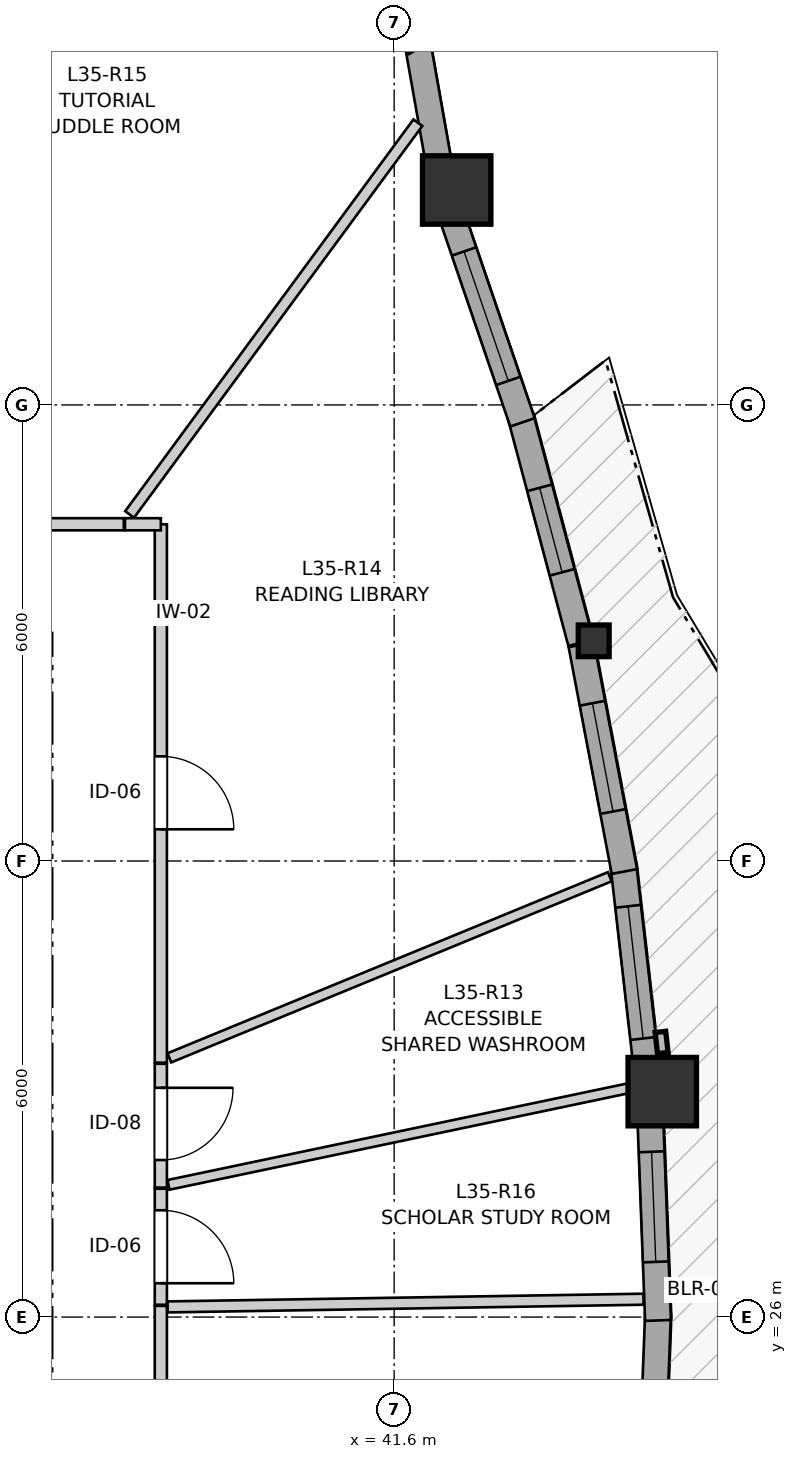
"""IFC4 building model, lengths in metres.
Left out: names, types, materials, properties, quantities, classifications, styles, units other than length and angle.
Written with IfcOpenShell. Run it as: python <this file> out.ifc"""

import sys

from ifc_helpers import new_model, si_unit, direction, frame, frame_2d, origin, origin_2d, place, context, subcontext, project, spatial, rectangle, i_section, extrude, source, transform, mapped, element, fill, save


model = new_model("IFC4")
c1 = context("Model", 3, precision=1e-05, world=origin(), true_north=direction((0.0, 1.0)))
c2 = subcontext(c1, "Body", "Model", "MODEL_VIEW")
j1 = project(units=[si_unit("LENGTHUNIT", "METRE"), si_unit("PLANEANGLEUNIT", "RADIAN")], contexts=[c1])
p1 = place(None, origin())
s1 = spatial("IfcSite", under=j1, at=p1, CompositionType="ELEMENT")
p2 = place(p1, origin())
s2 = spatial("IfcBuilding", under=s1, at=p2, CompositionType="ELEMENT")
p3 = place(p2, frame((0.0, 0.0, 118.4)))
s3 = spatial("IfcBuildingStorey", under=s2, at=p3, CompositionType="ELEMENT", Elevation=118.4)
m1 = source(origin(), c2, "Body", "SweptSolid", [
    extrude(rectangle(XDim=0.9, YDim=0.9, at=origin_2d()), origin(), (0.0, 0.0, 1.0), 2.95),
])
p4 = place(p3, frame((45.127, 28.966, 0.0), z_axis=(0.0, 0.0, 1.0), x_axis=(1.0, 0.0, 0.0)))
e1 = element("IfcColumn", 1, at=p4, inside=s3, PredefinedType="COLUMN", context=c2, shape_type="MappedRepresentation", body=[
    mapped(m1, transform((0.0, 0.0, 0.0), x_axis=(1.0, 0.0, 0.0), y_axis=(0.0, 1.0, 0.0), z_axis=(0.0, 0.0, 1.0), scale=1.0)),
])
m2 = source(origin(), c2, "Body", "SweptSolid", [
    extrude(i_section(OverallWidth=0.406, OverallDepth=0.416, WebThickness=0.027, FlangeThickness=0.044, FilletRadius=0.015, at=origin_2d()), origin(), (0.0, 0.0, 1.0), 2.95),
])
p5 = place(p3, frame((44.226, 34.896, 0.0), z_axis=(0.0, 0.0, 1.0), x_axis=(1.0, 0.0, 0.0)))
e2 = element("IfcColumn", 2, at=p5, inside=s3, PredefinedType="PILASTER", context=c2, shape_type="MappedRepresentation", body=[
    mapped(m2, transform((0.0, 0.0, 0.0), x_axis=(1.0, 0.0, 0.0), y_axis=(0.0, 1.0, 0.0), z_axis=(0.0, 0.0, 1.0), scale=1.0)),
])
p6 = place(p3, frame((42.423, 40.828, 0.0), z_axis=(0.0, 0.0, 1.0), x_axis=(1.0, 0.0, 0.0)))
e3 = element("IfcColumn", 3, at=p6, inside=s3, PredefinedType="COLUMN", context=c2, shape_type="MappedRepresentation", body=[
    mapped(m1, transform((0.0, 0.0, 0.0), x_axis=(1.0, 0.0, 0.0), y_axis=(0.0, 1.0, 0.0), z_axis=(0.0, 0.0, 1.0), scale=1.0)),
])
p7 = place(p3, frame((44.958, 23.061, 0.0), z_axis=(0.0, 0.0, 1.0), x_axis=(0.037940097137, 0.999280015326, 0.0)))
e4 = element("IfcWall", 4, at=p7, inside=s3, PredefinedType="SOLIDWALL", context=c2, shape_type="SweptSolid", body=[
    extrude(rectangle(XDim=2.986, YDim=0.34, at=frame_2d((1.493, 0.0))), origin(), (0.0, 0.0, 1.0), 2.48),
])
p8 = place(p7, frame((1.008, 0.0, 0.82)))
e5 = element("IfcOpeningElement", 5, at=p8, cuts=e4, PredefinedType="OPENING", context=c2, shape_type="SweptSolid", body=[
    extrude(rectangle(XDim=0.95, YDim=1.35, at=frame_2d((0.475, 0.675))), frame((0.0, 0.18, 0.0), z_axis=(0.0, -1.0, 0.0), x_axis=(1.0, 0.0, 0.0)), (0.0, 0.0, 1.0), 0.36),
])
p9 = place(p3, frame((45.071, 25.956, 0.0), z_axis=(0.0, 0.0, 1.0), x_axis=(-0.037997361734, 0.999277839493, 0.0)))
e6 = element("IfcWall", 6, at=p9, inside=s3, PredefinedType="SOLIDWALL", context=c2, shape_type="SweptSolid", body=[
    extrude(rectangle(XDim=2.776, YDim=0.34, at=frame_2d((1.388, 0.0))), origin(), (0.0, 0.0, 1.0), 2.48),
])
p10 = place(p9, frame((0.771, 0.0, 0.82)))
e7 = element("IfcOpeningElement", 7, at=p10, cuts=e6, PredefinedType="OPENING", context=c2, shape_type="SweptSolid", body=[
    extrude(rectangle(XDim=1.45, YDim=1.25, at=frame_2d((0.725, 0.625))), frame((0.0, 0.18, 0.0), z_axis=(0.0, -1.0, 0.0), x_axis=(1.0, 0.0, 0.0)), (0.0, 0.0, 1.0), 0.36),
])
p11 = place(p3, frame((44.932, 29.175, 0.0), z_axis=(0.0, 0.0, 1.0), x_axis=(-0.113290188042, 0.993561942354, 0.0)))
e8 = element("IfcWall", 8, at=p11, inside=s3, PredefinedType="SOLIDWALL", context=c2, shape_type="SweptSolid", body=[
    extrude(rectangle(XDim=2.793, YDim=0.34, at=frame_2d((1.396, 0.0))), origin(), (0.0, 0.0, 1.0), 2.48),
])
p12 = place(p11, frame((0.493, 0.0, 0.82)))
e9 = element("IfcOpeningElement", 9, at=p12, cuts=e8, PredefinedType="OPENING", context=c2, shape_type="SweptSolid", body=[
    extrude(rectangle(XDim=1.75, YDim=1.3, at=frame_2d((0.875, 0.65))), frame((0.0, 0.18, 0.0), z_axis=(0.0, -1.0, 0.0), x_axis=(1.0, 0.0, 0.0)), (0.0, 0.0, 1.0), 0.36),
])
p13 = place(p3, frame((44.629, 31.862, 0.0), z_axis=(0.0, 0.0, 1.0), x_axis=(-0.186690909565, 0.982418701108, 0.0)))
e10 = element("IfcWall", 10, at=p13, inside=s3, PredefinedType="SOLIDWALL", context=c2, shape_type="SweptSolid", body=[
    extrude(rectangle(XDim=3.037, YDim=0.34, at=frame_2d((1.518, 0.0))), origin(), (0.0, 0.0, 1.0), 2.48),
])
p14 = place(p13, frame((0.803, 0.0, 0.82)))
e11 = element("IfcOpeningElement", 11, at=p14, cuts=e10, PredefinedType="OPENING", context=c2, shape_type="SweptSolid", body=[
    extrude(rectangle(XDim=1.45, YDim=1.25, at=frame_2d((0.725, 0.625))), frame((0.0, 0.18, 0.0), z_axis=(0.0, -1.0, 0.0), x_axis=(1.0, 0.0, 0.0)), (0.0, 0.0, 1.0), 0.36),
])
p15 = place(p3, frame((44.056, 34.872, 0.0), z_axis=(0.0, 0.0, 1.0), x_axis=(-0.257081647056, 0.966389686797, 0.0)))
e12 = element("IfcWall", 12, at=p15, inside=s3, PredefinedType="SOLIDWALL", context=c2, shape_type="SweptSolid", body=[
    extrude(rectangle(XDim=3.086, YDim=0.34, at=frame_2d((1.543, 0.0))), origin(), (0.0, 0.0, 1.0), 2.48),
])
p16 = place(p15, frame((0.958, 0.0, 0.82)))
e13 = element("IfcOpeningElement", 13, at=p16, cuts=e12, PredefinedType="OPENING", context=c2, shape_type="SweptSolid", body=[
    extrude(rectangle(XDim=1.15, YDim=1.2, at=frame_2d((0.575, 0.6))), frame((0.0, 0.18, 0.0), z_axis=(0.0, -1.0, 0.0), x_axis=(1.0, 0.0, 0.0)), (0.0, 0.0, 1.0), 0.36),
])
p17 = place(p3, frame((43.288, 37.771, 0.0), z_axis=(0.0, 0.0, 1.0), x_axis=(-0.323537149191, 0.94621546864, 0.0)))
e14 = element("IfcWall", 14, at=p17, inside=s3, PredefinedType="SOLIDWALL", context=c2, shape_type="SweptSolid", body=[
    extrude(rectangle(XDim=2.942, YDim=0.34, at=frame_2d((1.471, 0.0))), origin(), (0.0, 0.0, 1.0), 2.48),
])
p18 = place(p17, frame((0.576, 0.0, 0.82)))
e15 = element("IfcOpeningElement", 15, at=p18, cuts=e14, PredefinedType="OPENING", context=c2, shape_type="SweptSolid", body=[
    extrude(rectangle(XDim=1.8, YDim=1.45, at=frame_2d((0.9, 0.725))), frame((0.0, 0.18, 0.0), z_axis=(0.0, -1.0, 0.0), x_axis=(1.0, 0.0, 0.0)), (0.0, 0.0, 1.0), 0.36),
])
p19 = place(p3, frame((42.215, 41.024, 0.0), z_axis=(0.0, 0.0, 1.0), x_axis=(-0.17440141227, 0.984674640375, 0.0)))
e16 = element("IfcWall", 16, at=p19, inside=s3, PredefinedType="SOLIDWALL", context=c2, shape_type="SweptSolid", body=[
    extrude(rectangle(XDim=1.831, YDim=0.34, at=frame_2d((0.916, 0.0))), origin(), (0.0, 0.0, 1.0), 2.48),
])
p20 = place(p3, frame((41.942, 42.701, 0.0), z_axis=(0.0, 0.0, 1.0), x_axis=(-0.501902596059, 0.864924149315, 0.0)))
e17 = element("IfcWall", 17, at=p20, inside=s3, PredefinedType="SOLIDWALL", context=c2, shape_type="SweptSolid", body=[
    extrude(rectangle(XDim=2.099, YDim=0.34, at=frame_2d((1.049, 0.0))), origin(), (0.0, 0.0, 1.0), 2.48),
])
p21 = place(p20, frame((0.3, 0.0, 0.82)))
e18 = element("IfcOpeningElement", 18, at=p21, cuts=e17, PredefinedType="OPENING", context=c2, shape_type="SweptSolid", body=[
    extrude(rectangle(XDim=1.5, YDim=1.45, at=frame_2d((0.75, 0.725))), frame((0.0, 0.18, 0.0), z_axis=(0.0, -1.0, 0.0), x_axis=(1.0, 0.0, 0.0)), (0.0, 0.0, 1.0), 0.36),
])
p22 = place(p3, frame((38.53, 36.43, 0.0), z_axis=(0.0, 0.0, 1.0), x_axis=(0.0, -1.0, 0.0)))
e19 = element("IfcWall", 19, at=p22, inside=s3, PredefinedType="PARTITIONING", context=c2, shape_type="SweptSolid", body=[
    extrude(rectangle(XDim=7.083, YDim=0.16, at=frame_2d((3.542, 0.0))), origin(), (0.0, 0.0, 1.0), 2.588),
])
p23 = place(p22, frame((3.053, 0.0, 0.0)))
e20 = element("IfcOpeningElement", 20, at=p23, cuts=e19, PredefinedType="OPENING", context=c2, shape_type="SweptSolid", body=[
    extrude(rectangle(XDim=0.96, YDim=2.1, at=frame_2d((0.48, 1.05))), frame((0.0, 0.09, 0.0), z_axis=(0.0, -1.0, 0.0), x_axis=(1.0, 0.0, 0.0)), (0.0, 0.0, 1.0), 0.18),
])
p24 = place(p3, frame((32.925, 36.43, 0.0), z_axis=(0.0, 0.0, 1.0), x_axis=(1.0, 0.0, 0.0)))
e21 = element("IfcWall", 21, at=p24, inside=s3, PredefinedType="PARTITIONING", context=c2, shape_type="SweptSolid", body=[
    extrude(rectangle(XDim=5.118, YDim=0.16, at=frame_2d((2.559, 0.0))), origin(), (0.0, 0.0, 1.0), 2.588),
])
p25 = place(p24, frame((1.907, 0.0, 0.0)))
e22 = element("IfcOpeningElement", 22, at=p25, cuts=e21, PredefinedType="OPENING", context=c2, shape_type="SweptSolid", body=[
    extrude(rectangle(XDim=1.3, YDim=2.1, at=frame_2d((0.65, 1.05))), frame((0.0, 0.09, 0.0), z_axis=(0.0, -1.0, 0.0), x_axis=(1.0, 0.0, 0.0)), (0.0, 0.0, 1.0), 0.18),
])
p26 = place(p3, frame((38.53, 26.147, 0.0), z_axis=(0.0, 0.0, 1.0), x_axis=(0.0, -1.0, 0.0)))
e23 = element("IfcWall", 23, at=p26, inside=s3, PredefinedType="PARTITIONING", context=c2, shape_type="SweptSolid", body=[
    extrude(rectangle(XDim=4.811, YDim=0.16, at=frame_2d((2.406, 0.0))), origin(), (0.0, 0.0, 1.0), 2.95),
])
p27 = place(p26, frame((1.949, 0.0, 0.0)))
e24 = element("IfcOpeningElement", 24, at=p27, cuts=e23, PredefinedType="OPENING", context=c2, shape_type="SweptSolid", body=[
    extrude(rectangle(XDim=0.96, YDim=2.1, at=frame_2d((0.48, 1.05))), frame((0.0, 0.09, 0.0), z_axis=(0.0, -1.0, 0.0), x_axis=(1.0, 0.0, 0.0)), (0.0, 0.0, 1.0), 0.18),
])
p28 = place(p3, frame((38.53, 29.332, 0.0), z_axis=(0.0, 0.0, 1.0), x_axis=(0.0, -1.0, 0.0)))
e25 = element("IfcWall", 25, at=p28, inside=s3, PredefinedType="PARTITIONING", context=c2, shape_type="SweptSolid", body=[
    extrude(rectangle(XDim=1.629, YDim=0.16, at=frame_2d((0.814, 0.0))), origin(), (0.0, 0.0, 1.0), 2.95),
])
p29 = place(p28, frame((0.316, 0.0, 0.0)))
e26 = element("IfcOpeningElement", 26, at=p29, cuts=e25, PredefinedType="OPENING", context=c2, shape_type="SweptSolid", body=[
    extrude(rectangle(XDim=0.95, YDim=2.1, at=frame_2d((0.475, 1.05))), frame((0.0, 0.09, 0.0), z_axis=(0.0, -1.0, 0.0), x_axis=(1.0, 0.0, 0.0)), (0.0, 0.0, 1.0), 0.18),
])
p30 = place(p3, frame((38.53, 27.688, 0.0), z_axis=(0.0, 0.0, 1.0), x_axis=(0.0, -1.0, 0.0)))
e27 = element("IfcWall", 27, at=p30, inside=s3, PredefinedType="PARTITIONING", context=c2, shape_type="SweptSolid", body=[
    extrude(rectangle(XDim=1.526, YDim=0.16, at=frame_2d((0.763, 0.0))), origin(), (0.0, 0.0, 1.0), 2.95),
])
p31 = place(p30, frame((0.283, 0.0, 0.0)))
e28 = element("IfcOpeningElement", 28, at=p31, cuts=e27, PredefinedType="OPENING", context=c2, shape_type="SweptSolid", body=[
    extrude(rectangle(XDim=0.96, YDim=2.1, at=frame_2d((0.48, 1.05))), frame((0.0, 0.09, 0.0), z_axis=(0.0, -1.0, 0.0), x_axis=(1.0, 0.0, 0.0)), (0.0, 0.0, 1.0), 0.18),
])
p32 = place(p3, frame((38.119, 36.559, 0.0), z_axis=(0.0, 0.0, 1.0), x_axis=(0.592704345809, 0.805420113021, 0.0)))
e29 = element("IfcWall", 29, at=p32, inside=s3, PredefinedType="PARTITIONING", context=c2, shape_type="SweptSolid", body=[
    extrude(rectangle(XDim=6.399, YDim=0.145, at=frame_2d((3.199, 0.0))), origin(), (0.0, 0.0, 1.0), 2.95),
])
p33 = place(p3, frame((38.642, 29.41, 0.0), z_axis=(0.0, 0.0, 1.0), x_axis=(0.924865201518, 0.380295094659, 0.0)))
e30 = element("IfcWall", 30, at=p33, inside=s3, PredefinedType="PARTITIONING", context=c2, shape_type="SweptSolid", body=[
    extrude(rectangle(XDim=6.266, YDim=0.13, at=frame_2d((3.133, 0.0))), origin(), (0.0, 0.0, 1.0), 2.95),
])
p34 = place(p3, frame((38.631, 27.739, 0.0), z_axis=(0.0, 0.0, 1.0), x_axis=(0.978654667538, 0.205511658323, 0.0)))
e31 = element("IfcWall", 31, at=p34, inside=s3, PredefinedType="PARTITIONING", context=c2, shape_type="SweptSolid", body=[
    extrude(rectangle(XDim=6.29, YDim=0.13, at=frame_2d((3.145, 0.0))), origin(), (0.0, 0.0, 1.0), 2.368),
])
p35 = place(p3, frame((38.619, 26.133, 0.0), z_axis=(0.0, 0.0, 1.0), x_axis=(0.999869130012, 0.016177850558, 0.0)))
e32 = element("IfcWall", 32, at=p35, inside=s3, PredefinedType="PARTITIONING", context=c2, shape_type="SweptSolid", body=[
    extrude(rectangle(XDim=6.263, YDim=0.145, at=frame_2d((3.131, 0.0))), origin(), (0.0, 0.0, 1.0), 2.95),
])
p36 = place(p3, frame((38.058, 36.43, 0.0), z_axis=(0.0, 0.0, 1.0), x_axis=(1.0, 0.0, 0.0)))
e33 = element("IfcWall", 33, at=p36, inside=s3, PredefinedType="PARTITIONING", context=c2, shape_type="SweptSolid", body=[
    extrude(rectangle(XDim=0.472, YDim=0.16, at=frame_2d((0.236, 0.0))), origin(), (0.0, 0.0, 1.0), 2.588),
])
m3 = source(origin(), c2, "Body", "SweptSolid", [
    extrude(rectangle(XDim=1.45, YDim=1.25, at=frame_2d((0.725, 0.625))), frame((0.0, 0.03, 0.0), z_axis=(0.0, -1.0, 0.0), x_axis=(1.0, 0.0, 0.0)), (0.0, 0.0, 1.0), 0.06),
])
p37 = place(p10, origin())
e34 = element("IfcWindow", 34, at=p37, inside=s3, PartitioningType="SINGLE_PANEL", PredefinedType="WINDOW", context=c2, shape_type="MappedRepresentation", body=[
    mapped(m3, transform((0.0, 0.0, 0.0), x_axis=(1.0, 0.0, 0.0), y_axis=(0.0, 1.0, 0.0), z_axis=(0.0, 0.0, 1.0), scale=1.0)),
])
fill(e7, e34)
m4 = source(origin(), c2, "Body", "SweptSolid", [
    extrude(rectangle(XDim=1.75, YDim=1.3, at=frame_2d((0.875, 0.65))), frame((0.0, 0.03, 0.0), z_axis=(0.0, -1.0, 0.0), x_axis=(1.0, 0.0, 0.0)), (0.0, 0.0, 1.0), 0.06),
])
p38 = place(p12, origin())
e35 = element("IfcWindow", 35, at=p38, inside=s3, PartitioningType="SINGLE_PANEL", PredefinedType="WINDOW", context=c2, shape_type="MappedRepresentation", body=[
    mapped(m4, transform((0.0, 0.0, 0.0), x_axis=(1.0, 0.0, 0.0), y_axis=(0.0, 1.0, 0.0), z_axis=(0.0, 0.0, 1.0), scale=1.0)),
])
fill(e9, e35)
p39 = place(p14, origin())
e36 = element("IfcWindow", 36, at=p39, inside=s3, PartitioningType="SINGLE_PANEL", PredefinedType="WINDOW", context=c2, shape_type="MappedRepresentation", body=[
    mapped(m3, transform((0.0, 0.0, 0.0), x_axis=(1.0, 0.0, 0.0), y_axis=(0.0, 1.0, 0.0), z_axis=(0.0, 0.0, 1.0), scale=1.0)),
])
fill(e11, e36)
m5 = source(origin(), c2, "Body", "SweptSolid", [
    extrude(rectangle(XDim=1.15, YDim=1.2, at=frame_2d((0.575, 0.6))), frame((0.0, 0.03, 0.0), z_axis=(0.0, -1.0, 0.0), x_axis=(1.0, 0.0, 0.0)), (0.0, 0.0, 1.0), 0.06),
])
p40 = place(p16, origin())
e37 = element("IfcWindow", 37, at=p40, inside=s3, PartitioningType="SINGLE_PANEL", PredefinedType="WINDOW", context=c2, shape_type="MappedRepresentation", body=[
    mapped(m5, transform((0.0, 0.0, 0.0), x_axis=(1.0, 0.0, 0.0), y_axis=(0.0, 1.0, 0.0), z_axis=(0.0, 0.0, 1.0), scale=1.0)),
])
fill(e13, e37)
m6 = source(origin(), c2, "Body", "SweptSolid", [
    extrude(rectangle(XDim=1.8, YDim=1.45, at=frame_2d((0.9, 0.725))), frame((0.0, 0.03, 0.0), z_axis=(0.0, -1.0, 0.0), x_axis=(1.0, 0.0, 0.0)), (0.0, 0.0, 1.0), 0.06),
])
p41 = place(p18, origin())
e38 = element("IfcWindow", 38, at=p41, inside=s3, PartitioningType="SINGLE_PANEL", PredefinedType="WINDOW", context=c2, shape_type="MappedRepresentation", body=[
    mapped(m6, transform((0.0, 0.0, 0.0), x_axis=(1.0, 0.0, 0.0), y_axis=(0.0, 1.0, 0.0), z_axis=(0.0, 0.0, 1.0), scale=1.0)),
])
fill(e15, e38)
m7 = source(origin(), c2, "Body", "SweptSolid", [
    extrude(rectangle(XDim=0.96, YDim=2.1, at=frame_2d((0.48, 1.05))), frame((0.0, 0.025, 0.0), z_axis=(0.0, -1.0, 0.0), x_axis=(1.0, 0.0, 0.0)), (0.0, 0.0, 1.0), 0.05),
])
p42 = place(p23, origin())
e39 = element("IfcDoor", 39, at=p42, inside=s3, OperationType="SINGLE_SWING_RIGHT", PredefinedType="DOOR", context=c2, shape_type="MappedRepresentation", body=[
    mapped(m7, transform((0.0, 0.0, 0.0), x_axis=(1.0, 0.0, 0.0), y_axis=(0.0, 1.0, 0.0), z_axis=(0.0, 0.0, 1.0), scale=1.0)),
])
fill(e20, e39)
m8 = source(origin(), c2, "Body", "SweptSolid", [
    extrude(rectangle(XDim=0.95, YDim=2.1, at=frame_2d((0.475, 1.05))), frame((0.0, 0.025, 0.0), z_axis=(0.0, -1.0, 0.0), x_axis=(1.0, 0.0, 0.0)), (0.0, 0.0, 1.0), 0.05),
])
p43 = place(p29, origin())
e40 = element("IfcDoor", 40, at=p43, inside=s3, OperationType="SINGLE_SWING_LEFT", PredefinedType="DOOR", context=c2, shape_type="MappedRepresentation", body=[
    mapped(m8, transform((0.0, 0.0, 0.0), x_axis=(1.0, 0.0, 0.0), y_axis=(0.0, 1.0, 0.0), z_axis=(0.0, 0.0, 1.0), scale=1.0)),
])
fill(e26, e40)
p44 = place(p31, origin())
e41 = element("IfcDoor", 41, at=p44, inside=s3, OperationType="SINGLE_SWING_RIGHT", PredefinedType="DOOR", context=c2, shape_type="MappedRepresentation", body=[
    mapped(m7, transform((0.0, 0.0, 0.0), x_axis=(1.0, 0.0, 0.0), y_axis=(0.0, 1.0, 0.0), z_axis=(0.0, 0.0, 1.0), scale=1.0)),
])
fill(e28, e41)
save(model, sys.argv[1])
